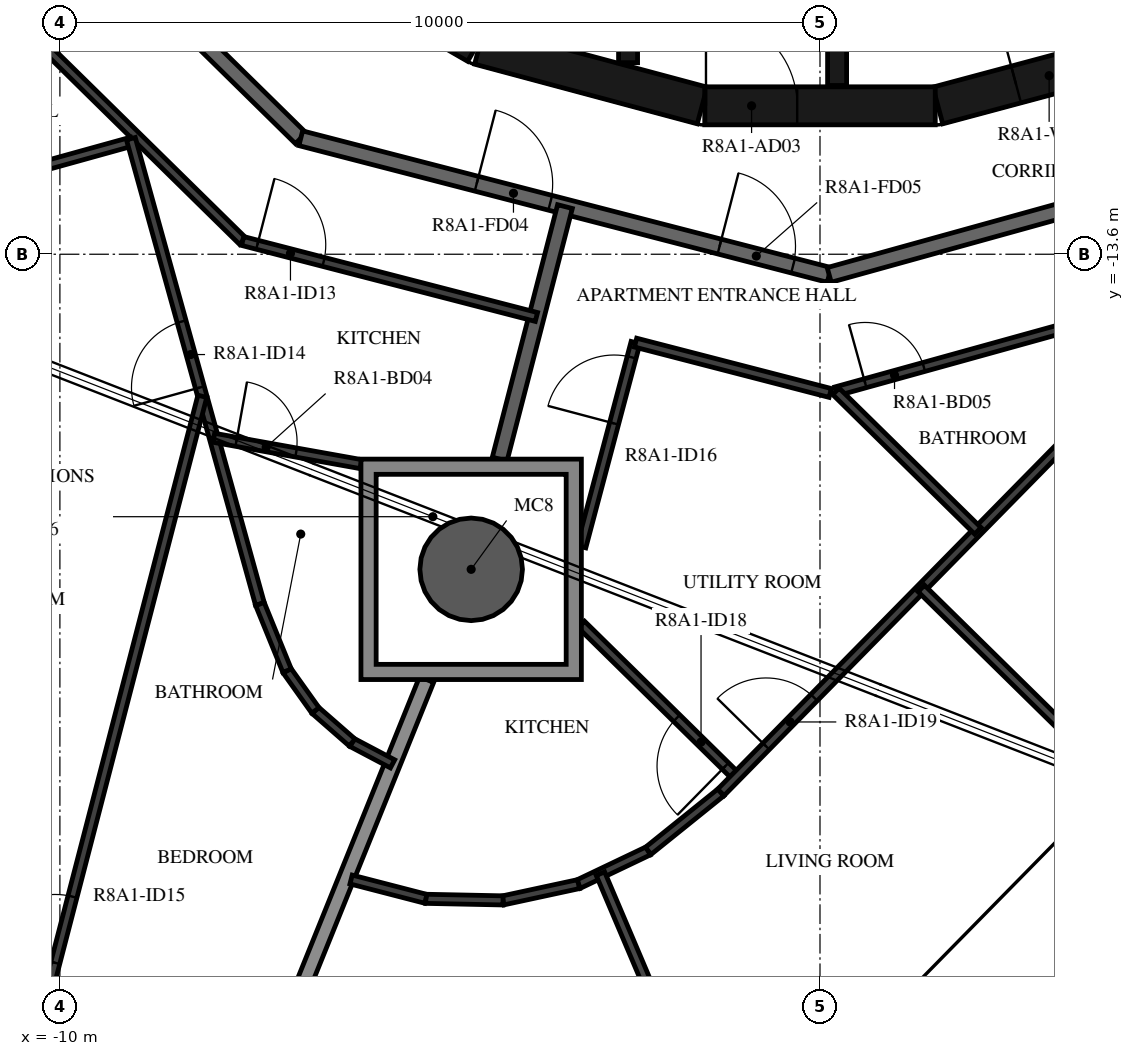
"""IFC4 building model, lengths in metres.
Left out: names, types, materials, properties, quantities, classifications, styles, units other than length and angle.
Written with IfcOpenShell. Run it as: python <this file> out.ifc"""

import sys

from ifc_helpers import new_model, si_unit, direction, frame, frame_2d, origin, origin_2d, place, context, subcontext, project, spatial, polyline, rectangle, hollow_circle, outline, extrude, element, fill, save


model = new_model("IFC4")
c1 = context("Model", 3, precision=1e-05, world=origin(), true_north=direction((0.0, 1.0)))
c2 = subcontext(c1, "Body", "Model", "MODEL_VIEW")
j1 = project(units=[si_unit("LENGTHUNIT", "METRE"), si_unit("PLANEANGLEUNIT", "RADIAN")], contexts=[c1])
p1 = place(None, origin())
s1 = spatial("IfcSite", under=j1, at=p1, CompositionType="ELEMENT")
p2 = place(p1, origin())
s2 = spatial("IfcBuilding", under=s1, at=p2, CompositionType="ELEMENT")
p3 = place(p2, frame((0.0, 0.0, 301.7)))
s3 = spatial("IfcBuildingStorey", under=s2, at=p3, CompositionType="ELEMENT", Elevation=301.7)
p4 = place(p3, frame((-4.589, -17.745, -0.38), z_axis=(0.0, 0.0, 1.0), x_axis=(1.0, 0.0, 0.0)))
e1 = element("IfcColumn", 1, at=p4, inside=s3, PredefinedType="COLUMN", context=c2, shape_type="SweptSolid", body=[
    extrude(hollow_circle(Radius=0.675, WallThickness=0.03, at=origin_2d()), origin(), (0.0, 0.0, 1.0), 3.5),
])
p5 = place(p3, frame((1.55, -11.643, 0.0), z_axis=(0.0, 0.0, 1.0), x_axis=(0.965948410781, 0.258734743916, 0.0)))
e2 = element("IfcWall", 2, at=p5, inside=s3, PredefinedType="SHEAR", context=c2, shape_type="SweptSolid", body=[
    extrude(rectangle(XDim=3.033, YDim=0.5, at=frame_2d((1.516, 0.0))), origin(), (0.0, 0.0, 1.0), 3.12),
])
p6 = place(p5, frame((1.066, 0.0, 0.0)))
e3 = element("IfcOpeningElement", 3, at=p6, cuts=e2, PredefinedType="OPENING", context=c2, shape_type="SweptSolid", body=[
    extrude(rectangle(XDim=0.9, YDim=2.1, at=frame_2d((0.45, 1.05))), frame((0.0, 0.26, 0.0), z_axis=(0.0, -1.0, 0.0), x_axis=(1.0, 0.0, 0.0)), (0.0, 0.0, 1.0), 0.52),
])
for number, where, z_axis, x_axis in (
    (4, (-7.137, -9.329, 0.0), (0.0, 0.0, 1.0), (0.866, -0.5, 0.0)),
    (5, (-4.479, -10.858, 0.0), (0.0, 0.0, 1.0), (0.966, -0.259, 0.0)),
):
    element("IfcWall", number, at=place(p3, frame(where, z_axis=z_axis, x_axis=x_axis)), inside=s3, PredefinedType="SHEAR", context=c2, shape_type="SweptSolid", body=[
        extrude(rectangle(XDim=3.033, YDim=0.5, at=frame_2d((1.516, 0.0))), origin(), (0.0, 0.0, 1.0), 3.12),
    ])
p7 = place(p3, frame((-1.516, -11.647, 0.0), z_axis=(0.0, 0.0, 1.0), x_axis=(1.0, 0.0, 0.0)))
e6 = element("IfcWall", 6, at=p7, inside=s3, PredefinedType="SHEAR", context=c2, shape_type="SweptSolid", body=[
    extrude(rectangle(XDim=3.033, YDim=0.5, at=frame_2d((1.516, 0.0))), origin(), (0.0, 0.0, 1.0), 3.12),
])
p8 = place(p7, frame((0.016, 0.0, 0.0)))
e7 = element("IfcOpeningElement", 7, at=p8, cuts=e6, PredefinedType="OPENING", context=c2, shape_type="SweptSolid", body=[
    extrude(rectangle(XDim=1.2, YDim=2.1, at=frame_2d((0.6, 1.05))), frame((0.0, 0.26, 0.0), z_axis=(0.0, -1.0, 0.0), x_axis=(1.0, 0.0, 0.0)), (0.0, 0.0, 1.0), 0.52),
])
p9 = place(p3, frame((-2.525, -8.97, 0.0), z_axis=(0.0, 0.0, 1.0), x_axis=(0.0, -1.0, 0.0)))
e8 = element("IfcWall", 8, at=p9, inside=s3, PredefinedType="SHEAR", context=c2, shape_type="SweptSolid", body=[
    extrude(rectangle(XDim=2.11, YDim=0.25, at=frame_2d((1.055, 0.0))), origin(), (0.0, 0.0, 1.0), 3.12),
])
p10 = place(p3, frame((0.225, -8.97, 0.0), z_axis=(0.0, 0.0, 1.0), x_axis=(0.0, -1.0, 0.0)))
e9 = element("IfcWall", 9, at=p10, inside=s3, PredefinedType="SHEAR", context=c2, shape_type="SweptSolid", body=[
    extrude(rectangle(XDim=2.41, YDim=0.25, at=frame_2d((1.205, 0.0))), origin(), (0.0, 0.0, 1.0), 3.12),
])
p11 = place(p3, frame((-11.953, -7.041, 0.0), z_axis=(0.0, 0.0, 1.0), x_axis=(0.713250549143, -0.70090916255, 0.0)))
e10 = element("IfcWall", 10, at=p11, inside=s3, PredefinedType="STANDARD", context=c2, shape_type="SweptSolid", body=[
    extrude(rectangle(XDim=7.181, YDim=0.2, at=frame_2d((3.59, 0.0))), origin(), (0.0, 0.0, 1.0), 3.12),
])
p12 = place(p3, frame((-6.831, -12.074, 0.0), z_axis=(0.0, 0.0, 1.0), x_axis=(0.968144780225, -0.250391063186, 0.0)))
e11 = element("IfcWall", 11, at=p12, inside=s3, PredefinedType="STANDARD", context=c2, shape_type="SweptSolid", body=[
    extrude(rectangle(XDim=7.181, YDim=0.2, at=frame_2d((3.591, 0.0))), origin(), (0.0, 0.0, 1.0), 3.12),
])
p13 = place(p12, frame((2.39, 0.0, 0.0)))
e12 = element("IfcOpeningElement", 12, at=p13, cuts=e11, PredefinedType="OPENING", context=c2, shape_type="SweptSolid", body=[
    extrude(rectangle(XDim=1.0, YDim=2.1, at=frame_2d((0.5, 1.05))), frame((0.0, 0.11, 0.0), z_axis=(0.0, -1.0, 0.0), x_axis=(1.0, 0.0, 0.0)), (0.0, 0.0, 1.0), 0.22),
])
p14 = place(p12, frame((5.69, 0.0, 0.0)))
e13 = element("IfcOpeningElement", 13, at=p14, cuts=e11, PredefinedType="OPENING", context=c2, shape_type="SweptSolid", body=[
    extrude(rectangle(XDim=1.0, YDim=2.1, at=frame_2d((0.5, 1.05))), frame((0.0, 0.11, 0.0), z_axis=(0.0, -1.0, 0.0), x_axis=(1.0, 0.0, 0.0)), (0.0, 0.0, 1.0), 0.22),
])
p15 = place(p3, frame((0.121, -13.872, 0.0), z_axis=(0.0, 0.0, 1.0), x_axis=(0.963625960674, 0.267254575108, 0.0)))
e14 = element("IfcWall", 14, at=p15, inside=s3, PredefinedType="STANDARD", context=c2, shape_type="SweptSolid", body=[
    extrude(rectangle(XDim=7.181, YDim=0.2, at=frame_2d((3.591, 0.0))), origin(), (0.0, 0.0, 1.0), 3.12),
])
p16 = place(p3, frame((-4.214, -16.295, 0.0), z_axis=(0.0, 0.0, 1.0), x_axis=(0.250428810918, 0.968135016752, 0.0)))
e15 = element("IfcWall", 15, at=p16, inside=s3, PredefinedType="STANDARD", context=c2, shape_type="SweptSolid", body=[
    extrude(rectangle(XDim=3.432, YDim=0.2, at=frame_2d((1.716, 0.0))), origin(), (0.0, 0.0, 1.0), 3.12),
])
p17 = place(p3, frame((-7.582, -25.151, 0.0), z_axis=(0.0, 0.0, 1.0), x_axis=(0.374645287615, 0.927168220156, 0.0)))
e16 = element("IfcWall", 16, at=p17, inside=s3, PredefinedType="STANDARD", context=c2, shape_type="SweptSolid", body=[
    extrude(rectangle(XDim=6.423, YDim=0.2, at=frame_2d((3.212, 0.0))), origin(), (0.0, 0.0, 1.0), 2.73),
])
p18 = place(p3, frame((-10.59, -10.483, 0.0), z_axis=(0.0, 0.0, 1.0), x_axis=(0.713244109461, -0.70091571556, 0.0)))
e17 = element("IfcWall", 17, at=p18, inside=s3, PredefinedType="PARTITIONING", context=c2, shape_type="SweptSolid", body=[
    extrude(rectangle(XDim=4.198, YDim=0.12, at=frame_2d((2.099, 0.0))), origin(), (0.0, 0.0, 1.0), 3.12),
])
p19 = place(p3, frame((-7.596, -13.426, 0.0), z_axis=(0.0, 0.0, 1.0), x_axis=(0.96815406745, -0.250355151095, 0.0)))
e18 = element("IfcWall", 18, at=p19, inside=s3, PredefinedType="PARTITIONING", context=c2, shape_type="SweptSolid", body=[
    extrude(rectangle(XDim=3.992, YDim=0.12, at=frame_2d((1.996, 0.0))), origin(), (0.0, 0.0, 1.0), 3.12),
])
p20 = place(p19, frame((0.2, 0.0, 0.0)))
e19 = element("IfcOpeningElement", 19, at=p20, cuts=e18, PredefinedType="OPENING", context=c2, shape_type="SweptSolid", body=[
    extrude(rectangle(XDim=0.9, YDim=2.1, at=frame_2d((0.45, 1.05))), frame((0.0, 0.07, 0.0), z_axis=(0.0, -1.0, 0.0), x_axis=(1.0, 0.0, 0.0)), (0.0, 0.0, 1.0), 0.14),
])
p21 = place(p3, frame((-14.066, -13.508, 0.0), z_axis=(0.0, 0.0, 1.0), x_axis=(0.963643585504, 0.267191018032, 0.0)))
e20 = element("IfcWall", 20, at=p21, inside=s3, PredefinedType="PARTITIONING", context=c2, shape_type="SweptSolid", body=[
    extrude(rectangle(XDim=5.2, YDim=0.12, at=frame_2d((2.6, 0.0))), origin(), (0.0, 0.0, 1.0), 2.73),
])
p22 = place(p3, frame((-7.368, -18.202, 0.0), z_axis=(0.0, 0.0, 1.0), x_axis=(-0.26723158658, 0.963632336077, 0.0)))
e21 = element("IfcWall", 21, at=p22, inside=s3, PredefinedType="PARTITIONING", context=c2, shape_type="SweptSolid", body=[
    extrude(rectangle(XDim=6.353, YDim=0.12, at=frame_2d((3.177, 0.0))), origin(), (0.0, 0.0, 1.0), 3.12),
])
p23 = place(p22, frame((2.956, 0.0, 0.0)))
e22 = element("IfcOpeningElement", 22, at=p23, cuts=e21, PredefinedType="OPENING", context=c2, shape_type="SweptSolid", body=[
    extrude(rectangle(XDim=0.9, YDim=2.1, at=frame_2d((0.45, 1.05))), frame((0.0, 0.07, 0.0), z_axis=(0.0, -1.0, 0.0), x_axis=(1.0, 0.0, 0.0)), (0.0, 0.0, 1.0), 0.14),
])
p24 = place(p3, frame((-10.186, -23.406, 0.0), z_axis=(0.0, 0.0, 1.0), x_axis=(0.251184292323, 0.967939280787, 0.0)))
e23 = element("IfcWall", 23, at=p24, inside=s3, PredefinedType="PARTITIONING", context=c2, shape_type="SweptSolid", body=[
    extrude(rectangle(XDim=8.2, YDim=0.12, at=frame_2d((4.1, 0.0))), origin(), (0.0, 0.0, 1.0), 3.12),
])
p25 = place(p24, frame((0.5, 0.0, 0.0)))
e24 = element("IfcOpeningElement", 24, at=p25, cuts=e23, PredefinedType="OPENING", context=c2, shape_type="SweptSolid", body=[
    extrude(rectangle(XDim=0.9, YDim=2.1, at=frame_2d((0.45, 1.05))), frame((0.0, 0.07, 0.0), z_axis=(0.0, -1.0, 0.0), x_axis=(1.0, 0.0, 0.0)), (0.0, 0.0, 1.0), 0.14),
])
p26 = place(p3, frame((-7.975, -16.015, 0.0), z_axis=(0.0, 0.0, 1.0), x_axis=(0.984356897167, -0.176185978441, 0.0)))
e25 = element("IfcWall", 25, at=p26, inside=s3, PredefinedType="PARTITIONING", context=c2, shape_type="SweptSolid", body=[
    extrude(rectangle(XDim=1.966, YDim=0.12, at=frame_2d((0.983, 0.0))), origin(), (0.0, 0.0, 1.0), 3.12),
])
p27 = place(p26, frame((0.3, 0.0, 0.0)))
e26 = element("IfcOpeningElement", 26, at=p27, cuts=e25, PredefinedType="OPENING", context=c2, shape_type="SweptSolid", body=[
    extrude(rectangle(XDim=0.8, YDim=2.1, at=frame_2d((0.4, 1.05))), frame((0.0, 0.07, 0.0), z_axis=(0.0, -1.0, 0.0), x_axis=(1.0, 0.0, 0.0)), (0.0, 0.0, 1.0), 0.14),
])
p28 = place(p3, frame((-5.623, -20.305, 0.0), z_axis=(0.0, 0.0, 1.0), x_axis=(-0.884133271246, 0.467234800369, 0.0)))
e27 = element("IfcWall", 27, at=p28, inside=s3, PredefinedType="PARTITIONING", context=c2, shape_type="SweptSolid", body=[
    extrude(rectangle(XDim=0.601, YDim=0.12, at=frame_2d((0.301, 0.0))), origin(), (0.0, 0.0, 1.0), 3.12),
])
p29 = place(p3, frame((-6.155, -20.024, 0.0), z_axis=(0.0, 0.0, 1.0), x_axis=(-0.753047703781, 0.657965923001, 0.0)))
e28 = element("IfcWall", 28, at=p29, inside=s3, PredefinedType="PARTITIONING", context=c2, shape_type="SweptSolid", body=[
    extrude(rectangle(XDim=0.642, YDim=0.12, at=frame_2d((0.321, 0.0))), origin(), (0.0, 0.0, 1.0), 3.12),
])
p30 = place(p3, frame((-6.638, -19.601, 0.0), z_axis=(0.0, 0.0, 1.0), x_axis=(-0.580662514246, 0.814144363458, 0.0)))
e29 = element("IfcWall", 29, at=p30, inside=s3, PredefinedType="PARTITIONING", context=c2, shape_type="SweptSolid", body=[
    extrude(rectangle(XDim=0.642, YDim=0.12, at=frame_2d((0.321, 0.0))), origin(), (0.0, 0.0, 1.0), 3.12),
])
p31 = place(p3, frame((-7.011, -19.079, 0.0), z_axis=(0.0, 0.0, 1.0), x_axis=(-0.377296887314, 0.92609235977, 0.0)))
e30 = element("IfcWall", 30, at=p31, inside=s3, PredefinedType="PARTITIONING", context=c2, shape_type="SweptSolid", body=[
    extrude(rectangle(XDim=0.947, YDim=0.12, at=frame_2d((0.473, 0.0))), origin(), (0.0, 0.0, 1.0), 3.12),
])
p32 = place(p3, frame((-3.139, -17.448, 0.0), z_axis=(0.0, 0.0, 1.0), x_axis=(0.256551998295, 0.966530430028, 0.0)))
e31 = element("IfcWall", 31, at=p32, inside=s3, PredefinedType="PARTITIONING", context=c2, shape_type="SweptSolid", body=[
    extrude(rectangle(XDim=2.778, YDim=0.12, at=frame_2d((1.389, 0.0))), origin(), (0.0, 0.0, 1.0), 3.12),
])
p33 = place(p32, frame((1.678, 0.0, 0.0)))
e32 = element("IfcOpeningElement", 32, at=p33, cuts=e31, PredefinedType="OPENING", context=c2, shape_type="SweptSolid", body=[
    extrude(rectangle(XDim=0.9, YDim=2.1, at=frame_2d((0.45, 1.05))), frame((0.0, 0.07, 0.0), z_axis=(0.0, -1.0, 0.0), x_axis=(1.0, 0.0, 0.0)), (0.0, 0.0, 1.0), 0.14),
])
p34 = place(p3, frame((-2.427, -14.763, 0.0), z_axis=(0.0, 0.0, 1.0), x_axis=(0.968151154118, -0.250366417036, 0.0)))
e33 = element("IfcWall", 33, at=p34, inside=s3, PredefinedType="PARTITIONING", context=c2, shape_type="SweptSolid", body=[
    extrude(rectangle(XDim=2.646, YDim=0.12, at=frame_2d((1.323, 0.0))), origin(), (0.0, 0.0, 1.0), 3.12),
])
p35 = place(p3, frame((0.21, -15.404, 0.0), z_axis=(0.0, 0.0, 1.0), x_axis=(0.963630625717, 0.267237754032, 0.0)))
e34 = element("IfcWall", 34, at=p35, inside=s3, PredefinedType="PARTITIONING", context=c2, shape_type="SweptSolid", body=[
    extrude(rectangle(XDim=7.907, YDim=0.12, at=frame_2d((3.954, 0.0))), origin(), (0.0, 0.0, 1.0), 3.12),
])
p36 = place(p35, frame((0.4, 0.0, 0.0)))
e35 = element("IfcOpeningElement", 35, at=p36, cuts=e34, PredefinedType="OPENING", context=c2, shape_type="SweptSolid", body=[
    extrude(rectangle(XDim=0.8, YDim=2.1, at=frame_2d((0.4, 1.05))), frame((0.0, 0.07, 0.0), z_axis=(0.0, -1.0, 0.0), x_axis=(1.0, 0.0, 0.0)), (0.0, 0.0, 1.0), 0.14),
])
p37 = place(p35, frame((5.436, 0.0, 0.0)))
e36 = element("IfcOpeningElement", 36, at=p37, cuts=e34, PredefinedType="OPENING", context=c2, shape_type="SweptSolid", body=[
    extrude(rectangle(XDim=0.9, YDim=2.1, at=frame_2d((0.45, 1.05))), frame((0.0, 0.07, 0.0), z_axis=(0.0, -1.0, 0.0), x_axis=(1.0, 0.0, 0.0)), (0.0, 0.0, 1.0), 0.14),
])
p38 = place(p3, frame((-2.26, -21.449, 0.0), z_axis=(0.0, 0.0, 1.0), x_axis=(-0.90254047062, -0.430605038166, 0.0)))
e37 = element("IfcWall", 37, at=p38, inside=s3, PredefinedType="PARTITIONING", context=c2, shape_type="SweptSolid", body=[
    extrude(rectangle(XDim=1.016, YDim=0.12, at=frame_2d((0.508, 0.0))), origin(), (0.0, 0.0, 1.0), 3.12),
])
for number, where, z_axis, x_axis in (
    (38, (-3.177, -21.887, 0.0), (0.0, 0.0, 1.0), (-0.978, -0.211, 0.0)),
    (39, (-4.17, -22.101, 0.0), (0.0, 0.0, 1.0), (-1.0, 0.02, 0.0)),
):
    element("IfcWall", number, at=place(p3, frame(where, z_axis=z_axis, x_axis=x_axis)), inside=s3, PredefinedType="PARTITIONING", context=c2, shape_type="SweptSolid", body=[
        extrude(rectangle(XDim=1.016, YDim=0.12, at=frame_2d((0.508, 0.0))), origin(), (0.0, 0.0, 1.0), 3.12),
    ])
p39 = place(p3, frame((-5.186, -22.08, 0.0), z_axis=(0.0, 0.0, 1.0), x_axis=(-0.968145907309, 0.250386705241, 0.0)))
e40 = element("IfcWall", 40, at=p39, inside=s3, PredefinedType="PARTITIONING", context=c2, shape_type="SweptSolid", body=[
    extrude(rectangle(XDim=1.016, YDim=0.12, at=frame_2d((0.508, 0.0))), origin(), (0.0, 0.0, 1.0), 3.12),
])
p40 = place(p3, frame((-1.48, -25.066, 0.0), z_axis=(0.0, 0.0, 1.0), x_axis=(-0.3909326022, 0.920419306912, 0.0)))
e41 = element("IfcWall", 41, at=p40, inside=s3, PredefinedType="PARTITIONING", context=c2, shape_type="SweptSolid", body=[
    extrude(rectangle(XDim=3.604, YDim=0.12, at=frame_2d((1.802, 0.0))), origin(), (0.0, 0.0, 1.0), 2.73),
])
p41 = place(p40, frame((0.2, 0.0, 0.0)))
e42 = element("IfcOpeningElement", 42, at=p41, cuts=e41, PredefinedType="OPENING", context=c2, shape_type="SweptSolid", body=[
    extrude(rectangle(XDim=0.9, YDim=2.1, at=frame_2d((0.45, 1.05))), frame((0.0, 0.07, 0.0), z_axis=(0.0, -1.0, 0.0), x_axis=(1.0, 0.0, 0.0)), (0.0, 0.0, 1.0), 0.14),
])
p42 = place(p3, frame((-1.101, -20.474, 0.0), z_axis=(0.0, 0.0, 1.0), x_axis=(-0.713316946232, 0.700841589961, 0.0)))
e43 = element("IfcWall", 43, at=p42, inside=s3, PredefinedType="PARTITIONING", context=c2, shape_type="SweptSolid", body=[
    extrude(rectangle(XDim=2.857, YDim=0.12, at=frame_2d((1.429, 0.0))), origin(), (0.0, 0.0, 1.0), 3.12),
])
p43 = place(p42, frame((0.2, 0.0, 0.0)))
e44 = element("IfcOpeningElement", 44, at=p43, cuts=e43, PredefinedType="OPENING", context=c2, shape_type="SweptSolid", body=[
    extrude(rectangle(XDim=0.9, YDim=2.1, at=frame_2d((0.45, 1.05))), frame((0.0, 0.07, 0.0), z_axis=(0.0, -1.0, 0.0), x_axis=(1.0, 0.0, 0.0)), (0.0, 0.0, 1.0), 0.14),
])
p44 = place(p3, frame((-2.26, -21.449, 0.0), z_axis=(0.0, 0.0, 1.0), x_axis=(0.779021167429, 0.626997624156, 0.0)))
e45 = element("IfcWall", 45, at=p44, inside=s3, PredefinedType="PARTITIONING", context=c2, shape_type="SweptSolid", body=[
    extrude(rectangle(XDim=1.227, YDim=0.12, at=frame_2d((0.614, 0.0))), origin(), (0.0, 0.0, 1.0), 3.12),
])
p45 = place(p3, frame((-1.304, -20.68, 0.0), z_axis=(0.0, 0.0, 1.0), x_axis=(0.700896976526, 0.713262524108, 0.0)))
e46 = element("IfcWall", 46, at=p45, inside=s3, PredefinedType="PARTITIONING", context=c2, shape_type="SweptSolid", body=[
    extrude(rectangle(XDim=9.358, YDim=0.12, at=frame_2d((4.679, 0.0))), origin(), (0.0, 0.0, 1.0), 3.12),
])
p46 = place(p45, frame((0.849, 0.0, 0.0)))
e47 = element("IfcOpeningElement", 47, at=p46, cuts=e46, PredefinedType="OPENING", context=c2, shape_type="SweptSolid", body=[
    extrude(rectangle(XDim=0.9, YDim=2.1, at=frame_2d((0.45, 1.05))), frame((0.0, 0.07, 0.0), z_axis=(0.0, -1.0, 0.0), x_axis=(1.0, 0.0, 0.0)), (0.0, 0.0, 1.0), 0.14),
])
p47 = place(p3, frame((2.077, -17.239, 0.0), z_axis=(0.0, 0.0, 1.0), x_axis=(-0.713235001716, 0.700924983381, 0.0)))
e48 = element("IfcWall", 48, at=p47, inside=s3, PredefinedType="PARTITIONING", context=c2, shape_type="SweptSolid", body=[
    extrude(rectangle(XDim=2.618, YDim=0.12, at=frame_2d((1.309, 0.0))), origin(), (0.0, 0.0, 1.0), 3.12),
])
p48 = place(p3, frame((3.9, -20.521, 0.0), z_axis=(0.0, 0.0, 1.0), x_axis=(-0.713217465002, 0.700942827637, 0.0)))
e49 = element("IfcWall", 49, at=p48, inside=s3, PredefinedType="PARTITIONING", context=c2, shape_type="SweptSolid", body=[
    extrude(rectangle(XDim=3.6, YDim=0.12, at=frame_2d((1.8, 0.0))), origin(), (0.0, 0.0, 1.0), 2.73),
])
p49 = place(p3, origin())
e50 = element("IfcWall", 50, at=p49, inside=s3, PredefinedType="STANDARD", context=c2, shape_type="SweptSolid", body=[
    extrude(outline(polyline([(-3.139, -16.295), (-3.139, -19.195), (-6.039, -19.195), (-6.039, -16.295), (-3.139, -16.295)]), holes=[polyline([(-5.839, -18.995), (-3.339, -18.995), (-3.339, -16.495), (-5.839, -16.495), (-5.839, -18.995)])]), origin(), (0.0, 0.0, 1.0), 3.12),
])
p50 = place(p8, origin())
e51 = element("IfcDoor", 51, at=p50, inside=s3, OperationType="SINGLE_SWING_RIGHT", PredefinedType="DOOR", context=c2, shape_type="SweptSolid", body=[
    extrude(rectangle(XDim=1.2, YDim=2.1, at=frame_2d((0.6, 1.05))), frame((0.0, 0.025, 0.0), z_axis=(0.0, -1.0, 0.0), x_axis=(1.0, 0.0, 0.0)), (0.0, 0.0, 1.0), 0.05),
])
fill(e7, e51)
p51 = place(p6, origin())
e52 = element("IfcDoor", 52, at=p51, inside=s3, OperationType="SINGLE_SWING_RIGHT", PredefinedType="DOOR", context=c2, shape_type="SweptSolid", body=[
    extrude(rectangle(XDim=0.9, YDim=2.1, at=frame_2d((0.45, 1.05))), frame((0.0, 0.025, 0.0), z_axis=(0.0, -1.0, 0.0), x_axis=(1.0, 0.0, 0.0)), (0.0, 0.0, 1.0), 0.05),
])
fill(e3, e52)
p52 = place(p13, origin())
e53 = element("IfcDoor", 53, at=p52, inside=s3, OperationType="SINGLE_SWING_RIGHT", PredefinedType="DOOR", context=c2, shape_type="SweptSolid", body=[
    extrude(rectangle(XDim=1.0, YDim=2.1, at=frame_2d((0.5, 1.05))), frame((0.0, 0.025, 0.0), z_axis=(0.0, -1.0, 0.0), x_axis=(1.0, 0.0, 0.0)), (0.0, 0.0, 1.0), 0.05),
])
fill(e12, e53)
p53 = place(p20, origin())
e54 = element("IfcDoor", 54, at=p53, inside=s3, OperationType="SINGLE_SWING_RIGHT", PredefinedType="DOOR", context=c2, shape_type="SweptSolid", body=[
    extrude(rectangle(XDim=0.9, YDim=2.1, at=frame_2d((0.45, 1.05))), frame((0.0, 0.025, 0.0), z_axis=(0.0, -1.0, 0.0), x_axis=(1.0, 0.0, 0.0)), (0.0, 0.0, 1.0), 0.05),
])
fill(e19, e54)
p54 = place(p23, origin())
e55 = element("IfcDoor", 55, at=p54, inside=s3, OperationType="SINGLE_SWING_RIGHT", PredefinedType="DOOR", context=c2, shape_type="SweptSolid", body=[
    extrude(rectangle(XDim=0.9, YDim=2.1, at=frame_2d((0.45, 1.05))), frame((0.0, 0.025, 0.0), z_axis=(0.0, -1.0, 0.0), x_axis=(1.0, 0.0, 0.0)), (0.0, 0.0, 1.0), 0.05),
])
fill(e22, e55)
p55 = place(p25, origin())
e56 = element("IfcDoor", 56, at=p55, inside=s3, OperationType="SINGLE_SWING_RIGHT", PredefinedType="DOOR", context=c2, shape_type="SweptSolid", body=[
    extrude(rectangle(XDim=0.9, YDim=2.1, at=frame_2d((0.45, 1.05))), frame((0.0, 0.025, 0.0), z_axis=(0.0, -1.0, 0.0), x_axis=(1.0, 0.0, 0.0)), (0.0, 0.0, 1.0), 0.05),
])
fill(e24, e56)
p56 = place(p27, origin())
e57 = element("IfcDoor", 57, at=p56, inside=s3, OperationType="SINGLE_SWING_RIGHT", PredefinedType="DOOR", context=c2, shape_type="SweptSolid", body=[
    extrude(rectangle(XDim=0.8, YDim=2.1, at=frame_2d((0.4, 1.05))), frame((0.0, 0.025, 0.0), z_axis=(0.0, -1.0, 0.0), x_axis=(1.0, 0.0, 0.0)), (0.0, 0.0, 1.0), 0.05),
])
fill(e26, e57)
p57 = place(p14, origin())
e58 = element("IfcDoor", 58, at=p57, inside=s3, OperationType="SINGLE_SWING_LEFT", PredefinedType="DOOR", context=c2, shape_type="SweptSolid", body=[
    extrude(rectangle(XDim=1.0, YDim=2.1, at=frame_2d((0.5, 1.05))), frame((0.0, 0.025, 0.0), z_axis=(0.0, -1.0, 0.0), x_axis=(1.0, 0.0, 0.0)), (0.0, 0.0, 1.0), 0.05),
])
fill(e13, e58)
p58 = place(p33, origin())
e59 = element("IfcDoor", 59, at=p58, inside=s3, OperationType="SINGLE_SWING_LEFT", PredefinedType="DOOR", context=c2, shape_type="SweptSolid", body=[
    extrude(rectangle(XDim=0.9, YDim=2.1, at=frame_2d((0.45, 1.05))), frame((0.0, 0.025, 0.0), z_axis=(0.0, -1.0, 0.0), x_axis=(1.0, 0.0, 0.0)), (0.0, 0.0, 1.0), 0.05),
])
fill(e32, e59)
p59 = place(p36, origin())
e60 = element("IfcDoor", 60, at=p59, inside=s3, OperationType="SINGLE_SWING_LEFT", PredefinedType="DOOR", context=c2, shape_type="SweptSolid", body=[
    extrude(rectangle(XDim=0.8, YDim=2.1, at=frame_2d((0.4, 1.05))), frame((0.0, 0.025, 0.0), z_axis=(0.0, -1.0, 0.0), x_axis=(1.0, 0.0, 0.0)), (0.0, 0.0, 1.0), 0.05),
])
fill(e35, e60)
p60 = place(p43, origin())
e61 = element("IfcDoor", 61, at=p60, inside=s3, OperationType="SINGLE_SWING_LEFT", PredefinedType="DOOR", context=c2, shape_type="SweptSolid", body=[
    extrude(rectangle(XDim=0.9, YDim=2.1, at=frame_2d((0.45, 1.05))), frame((0.0, 0.025, 0.0), z_axis=(0.0, -1.0, 0.0), x_axis=(1.0, 0.0, 0.0)), (0.0, 0.0, 1.0), 0.05),
])
fill(e44, e61)
p61 = place(p46, origin())
e62 = element("IfcDoor", 62, at=p61, inside=s3, OperationType="SINGLE_SWING_LEFT", PredefinedType="DOOR", context=c2, shape_type="SweptSolid", body=[
    extrude(rectangle(XDim=0.9, YDim=2.1, at=frame_2d((0.45, 1.05))), frame((0.0, 0.025, 0.0), z_axis=(0.0, -1.0, 0.0), x_axis=(1.0, 0.0, 0.0)), (0.0, 0.0, 1.0), 0.05),
])
fill(e47, e62)
save(model, sys.argv[1])
